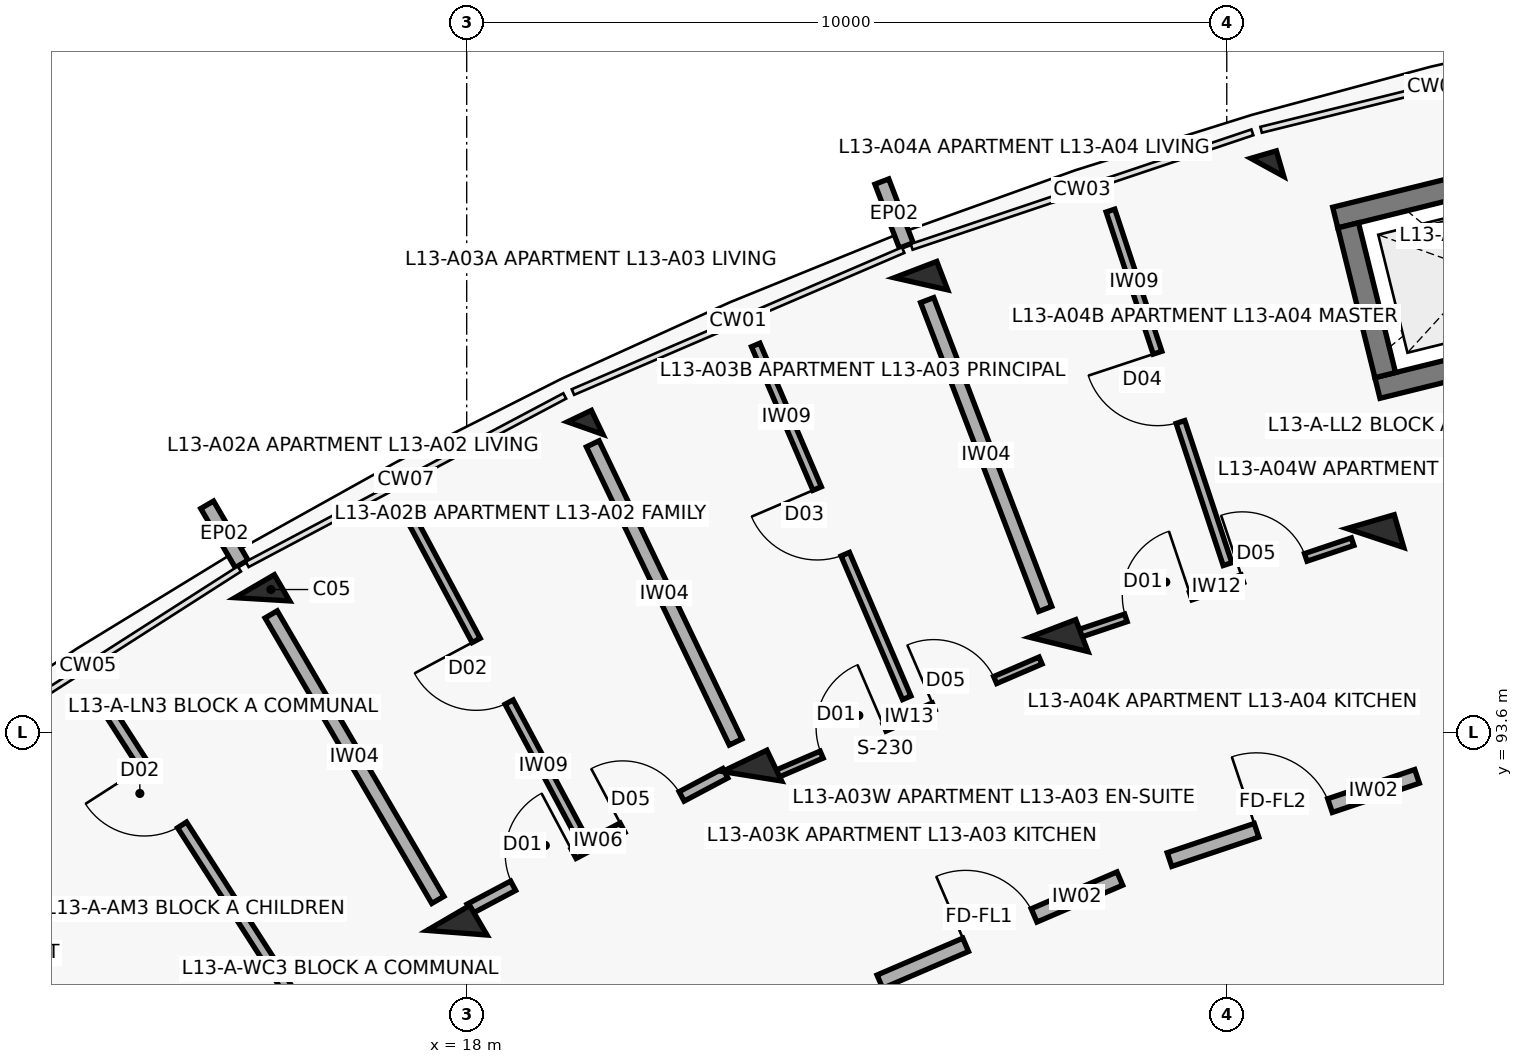
"""IFC4 building model, lengths in metres.
Left out: names, types, materials, properties, quantities, classifications, styles, units other than length and angle.
Written with IfcOpenShell. Run it as: python <this file> out.ifc"""

import sys

from ifc_helpers import new_model, si_unit, direction, frame, frame_2d, origin, origin_2d, place, context, subcontext, project, spatial, rectangle, extrude, element, fill, save


model = new_model("IFC4")
c1 = context("Model", 3, precision=1e-05, world=origin(), true_north=direction((0.0, 1.0)))
c2 = subcontext(c1, "Body", "Model", "MODEL_VIEW")
j1 = project(units=[si_unit("LENGTHUNIT", "METRE"), si_unit("PLANEANGLEUNIT", "RADIAN")], contexts=[c1])
p1 = place(None, origin())
s1 = spatial("IfcSite", under=j1, at=p1, CompositionType="ELEMENT")
p2 = place(p1, origin())
s2 = spatial("IfcBuilding", under=s1, at=p2, CompositionType="ELEMENT")
p3 = place(p2, frame((0.0, 0.0, 42.2)))
s3 = spatial("IfcBuildingStorey", under=s2, at=p3, CompositionType="ELEMENT", Elevation=42.2)
p4 = place(p3, frame((17.873, 90.96, 0.0), z_axis=(0.0, 0.0, 1.0), x_axis=(-0.504226211181, 0.863571611366, 0.0)))
e1 = element("IfcColumn", 1, at=p4, inside=s3, PredefinedType="COLUMN", context=c2, shape_type="SweptSolid", body=[
    extrude(rectangle(XDim=0.45, YDim=0.65, at=origin_2d()), origin(), (0.0, 0.0, 1.0), 3.1),
])
p5 = place(p3, frame((15.311, 95.347, 0.0), z_axis=(0.0, 0.0, 1.0), x_axis=(-0.504226211181, 0.863571611366, 0.0)))
e2 = element("IfcColumn", 2, at=p5, inside=s3, PredefinedType="COLUMN", context=c2, shape_type="SweptSolid", body=[
    extrude(rectangle(XDim=0.4, YDim=0.6, at=origin_2d()), origin(), (0.0, 0.0, 1.0), 3.1),
])
p6 = place(p3, frame((21.754, 93.019, 0.0), z_axis=(0.0, 0.0, 1.0), x_axis=(-0.432085748802, 0.901832526405, 0.0)))
e3 = element("IfcColumn", 3, at=p6, inside=s3, PredefinedType="COLUMN", context=c2, shape_type="SweptSolid", body=[
    extrude(rectangle(XDim=0.45, YDim=0.65, at=origin_2d()), origin(), (0.0, 0.0, 1.0), 3.1),
])
p7 = place(p3, frame((19.559, 97.6, 0.0), z_axis=(0.0, 0.0, 1.0), x_axis=(-0.432085748802, 0.901832526405, 0.0)))
e4 = element("IfcColumn", 4, at=p7, inside=s3, PredefinedType="COLUMN", context=c2, shape_type="SweptSolid", body=[
    extrude(rectangle(XDim=0.35, YDim=0.35, at=origin_2d()), origin(), (0.0, 0.0, 1.0), 3.1),
])
p8 = place(p3, frame((25.79, 94.753, 0.0), z_axis=(0.0, 0.0, 1.0), x_axis=(-0.357064076459, 0.934079892355, 0.0)))
e5 = element("IfcColumn", 5, at=p8, inside=s3, PredefinedType="COLUMN", context=c2, shape_type="SweptSolid", body=[
    extrude(rectangle(XDim=0.45, YDim=0.65, at=origin_2d()), origin(), (0.0, 0.0, 1.0), 3.1),
])
p9 = place(p3, frame((23.976, 99.499, 0.0), z_axis=(0.0, 0.0, 1.0), x_axis=(-0.357064076459, 0.934079892355, 0.0)))
e6 = element("IfcColumn", 6, at=p9, inside=s3, PredefinedType="COLUMN", context=c2, shape_type="SweptSolid", body=[
    extrude(rectangle(XDim=0.4, YDim=0.6, at=origin_2d()), origin(), (0.0, 0.0, 1.0), 3.1),
])
p10 = place(p3, frame((29.954, 96.153, 0.0), z_axis=(0.0, 0.0, 1.0), x_axis=(-0.27966144946, 0.96009867914, 0.0)))
e7 = element("IfcColumn", 7, at=p10, inside=s3, PredefinedType="COLUMN", context=c2, shape_type="SweptSolid", body=[
    extrude(rectangle(XDim=0.45, YDim=0.65, at=origin_2d()), origin(), (0.0, 0.0, 1.0), 3.1),
])
p11 = place(p3, frame((28.533, 101.031, 0.0), z_axis=(0.0, 0.0, 1.0), x_axis=(-0.27966144946, 0.96009867914, 0.0)))
e8 = element("IfcColumn", 8, at=p11, inside=s3, PredefinedType="COLUMN", context=c2, shape_type="SweptSolid", body=[
    extrude(rectangle(XDim=0.35, YDim=0.35, at=origin_2d()), origin(), (0.0, 0.0, 1.0), 3.1),
])
p12 = place(p3, frame((15.039, 95.813, 0.0), z_axis=(0.0, 0.0, 1.0), x_axis=(-0.504326383773, 0.863513114336, 0.0)))
e9 = element("IfcWall", 9, at=p12, inside=s3, PredefinedType="PARAPET", context=c2, shape_type="SweptSolid", body=[
    extrude(rectangle(XDim=0.9, YDim=0.195, at=frame_2d((0.45, 0.0))), origin(), (0.0, 0.0, 1.0), 2.25),
])
p13 = place(p3, frame((23.783, 100.003, 0.0), z_axis=(0.0, 0.0, 1.0), x_axis=(-0.356942580168, 0.934126326823, 0.0)))
e10 = element("IfcWall", 10, at=p13, inside=s3, PredefinedType="PARAPET", context=c2, shape_type="SweptSolid", body=[
    extrude(rectangle(XDim=0.9, YDim=0.195, at=frame_2d((0.45, 0.0))), origin(), (0.0, 0.0, 1.0), 2.25),
])
p14 = place(p3, frame((33.273, 98.942, 0.0), z_axis=(0.0, 0.0, 1.0), x_axis=(-0.970707542441, -0.240264160972, 0.0)))
e11 = element("IfcWall", 11, at=p14, inside=s3, PredefinedType="SHEAR", context=c2, shape_type="SweptSolid", body=[
    extrude(rectangle(XDim=3.39, YDim=0.28, at=frame_2d((1.695, 0.0))), origin(), (0.0, 0.0, 1.0), 3.55),
])
p15 = place(p14, frame((1.095, 0.0, 0.0)))
e12 = element("IfcOpeningElement", 12, at=p15, cuts=e11, PredefinedType="OPENING", context=c2, shape_type="SweptSolid", body=[
    extrude(rectangle(XDim=1.2, YDim=2.15, at=frame_2d((0.6, 1.075))), frame((0.0, 0.15, 0.0), z_axis=(0.0, -1.0, 0.0), x_axis=(1.0, 0.0, 0.0)), (0.0, 0.0, 1.0), 0.3),
])
p16 = place(p3, frame((32.718, 101.185, 0.0), z_axis=(0.0, 0.0, 1.0), x_axis=(-0.970711699588, -0.240247364777, 0.0)))
e13 = element("IfcWall", 13, at=p16, inside=s3, PredefinedType="SHEAR", context=c2, shape_type="SweptSolid", body=[
    extrude(rectangle(XDim=3.39, YDim=0.28, at=frame_2d((1.695, 0.0))), origin(), (0.0, 0.0, 1.0), 3.55),
])
p17 = place(p3, frame((30.085, 98.297, 0.0), z_axis=(0.0, 0.0, 1.0), x_axis=(-0.2402993748, 0.970698825832, 0.0)))
e14 = element("IfcWall", 14, at=p17, inside=s3, PredefinedType="SHEAR", context=c2, shape_type="SweptSolid", body=[
    extrude(rectangle(XDim=2.03, YDim=0.28, at=frame_2d((1.015, 0.0))), origin(), (0.0, 0.0, 1.0), 3.55),
])
p18 = place(p3, frame((17.524, 87.288, 0.0), z_axis=(0.0, 0.0, 1.0), x_axis=(-0.540338452216, 0.841447774408, 0.0)))
e15 = element("IfcWall", 15, at=p18, inside=s3, PredefinedType="PARTITIONING", context=c2, shape_type="SweptSolid", body=[
    extrude(rectangle(XDim=7.95, YDim=0.14, at=frame_2d((3.975, 0.0))), origin(), (0.0, 0.0, 1.0), 2.14),
])
p19 = place(p18, frame((6.05, 0.0, 0.0)))
e16 = element("IfcOpeningElement", 16, at=p19, cuts=e15, PredefinedType="OPENING", context=c2, shape_type="SweptSolid", body=[
    extrude(rectangle(XDim=0.92, YDim=2.1, at=frame_2d((0.46, 1.05))), frame((0.0, 0.08, 0.0), z_axis=(0.0, -1.0, 0.0), x_axis=(1.0, 0.0, 0.0)), (0.0, 0.0, 1.0), 0.16),
])
p20 = place(p3, frame((18.037, 91.273, 0.0), z_axis=(0.0, 0.0, 1.0), x_axis=(0.883441603894, 0.468541281543, 0.0)))
e17 = element("IfcWall", 17, at=p20, inside=s3, PredefinedType="PARTITIONING", context=c2, shape_type="SweptSolid", body=[
    extrude(rectangle(XDim=3.81, YDim=0.14, at=frame_2d((1.905, 0.0))), origin(), (0.0, 0.0, 1.0), 2.14),
])
p21 = place(p20, frame((0.65, 0.0, 0.0)))
e18 = element("IfcOpeningElement", 18, at=p21, cuts=e17, PredefinedType="OPENING", context=c2, shape_type="SweptSolid", body=[
    extrude(rectangle(XDim=0.9, YDim=2.1, at=frame_2d((0.45, 1.05))), frame((0.0, 0.08, 0.0), z_axis=(0.0, -1.0, 0.0), x_axis=(1.0, 0.0, 0.0)), (0.0, 0.0, 1.0), 0.16),
])
p22 = place(p20, frame((2.28, 0.0, 0.0)))
e19 = element("IfcOpeningElement", 19, at=p22, cuts=e17, PredefinedType="OPENING", context=c2, shape_type="SweptSolid", body=[
    extrude(rectangle(XDim=0.88, YDim=2.1, at=frame_2d((0.44, 1.05))), frame((0.0, 0.08, 0.0), z_axis=(0.0, -1.0, 0.0), x_axis=(1.0, 0.0, 0.0)), (0.0, 0.0, 1.0), 0.16),
])
p23 = place(p3, frame((19.46, 92.306, 0.0), z_axis=(0.0, 0.0, 1.0), x_axis=(-0.471228378949, 0.88201123285, 0.0)))
e20 = element("IfcWall", 20, at=p23, inside=s3, PredefinedType="PARTITIONING", context=c2, shape_type="SweptSolid", body=[
    extrude(rectangle(XDim=4.75, YDim=0.12, at=frame_2d((2.375, 0.0))), origin(), (0.0, 0.0, 1.0), 2.14),
])
p24 = place(p23, frame((1.915, 0.0, 0.0)))
e21 = element("IfcOpeningElement", 21, at=p24, cuts=e20, PredefinedType="OPENING", context=c2, shape_type="SweptSolid", body=[
    extrude(rectangle(XDim=0.92, YDim=2.1, at=frame_2d((0.46, 1.05))), frame((0.0, 0.07, 0.0), z_axis=(0.0, -1.0, 0.0), x_axis=(1.0, 0.0, 0.0)), (0.0, 0.0, 1.0), 0.14),
])
p25 = place(p3, frame((17.621, 91.392, 0.0), z_axis=(0.0, 0.0, 1.0), x_axis=(-0.504216452091, 0.863577309475, 0.0)))
e22 = element("IfcWall", 22, at=p25, inside=s3, PredefinedType="SOLIDWALL", context=c2, shape_type="SweptSolid", body=[
    extrude(rectangle(XDim=4.35, YDim=0.185, at=frame_2d((2.175, 0.0))), origin(), (0.0, 0.0, 1.0), 2.14),
])
p26 = place(p3, frame((23.437, 90.316, 0.0), z_axis=(0.0, 0.0, 1.0), x_axis=(0.918718172399, 0.394913813008, 0.0)))
e23 = element("IfcWall", 23, at=p26, inside=s3, PredefinedType="SOLIDWALL", context=c2, shape_type="SweptSolid", body=[
    extrude(rectangle(XDim=3.436, YDim=0.19, at=frame_2d((1.718, 0.0))), origin(), (0.0, 0.0, 1.0), 2.14),
])
p27 = place(p26, frame((1.228, 0.0, 0.0)))
e24 = element("IfcOpeningElement", 24, at=p27, cuts=e23, PredefinedType="OPENING", context=c2, shape_type="SweptSolid", body=[
    extrude(rectangle(XDim=0.98, YDim=2.15, at=frame_2d((0.49, 1.075))), frame((0.0, 0.105, 0.0), z_axis=(0.0, -1.0, 0.0), x_axis=(1.0, 0.0, 0.0)), (0.0, 0.0, 1.0), 0.21),
])
p28 = place(p3, frame((22.073, 93.047, 0.0), z_axis=(0.0, 0.0, 1.0), x_axis=(0.918737522346, 0.394868794707, 0.0)))
e25 = element("IfcWall", 25, at=p28, inside=s3, PredefinedType="PARTITIONING", context=c2, shape_type="SweptSolid", body=[
    extrude(rectangle(XDim=3.785, YDim=0.1, at=frame_2d((1.893, 0.0))), origin(), (0.0, 0.0, 1.0), 2.14),
])
p29 = place(p28, frame((0.65, 0.0, 0.0)))
e26 = element("IfcOpeningElement", 26, at=p29, cuts=e25, PredefinedType="OPENING", context=c2, shape_type="SweptSolid", body=[
    extrude(rectangle(XDim=0.9, YDim=2.1, at=frame_2d((0.45, 1.05))), frame((0.0, 0.06, 0.0), z_axis=(0.0, -1.0, 0.0), x_axis=(1.0, 0.0, 0.0)), (0.0, 0.0, 1.0), 0.12),
])
p30 = place(p28, frame((2.255, 0.0, 0.0)))
e27 = element("IfcOpeningElement", 27, at=p30, cuts=e25, PredefinedType="OPENING", context=c2, shape_type="SweptSolid", body=[
    extrude(rectangle(XDim=0.88, YDim=2.1, at=frame_2d((0.44, 1.05))), frame((0.0, 0.06, 0.0), z_axis=(0.0, -1.0, 0.0), x_axis=(1.0, 0.0, 0.0)), (0.0, 0.0, 1.0), 0.12),
])
p31 = place(p3, frame((23.789, 94.051, 0.0), z_axis=(0.0, 0.0, 1.0), x_axis=(-0.393539995583, 0.919307495823, 0.0)))
e28 = element("IfcWall", 28, at=p31, inside=s3, PredefinedType="PARTITIONING", context=c2, shape_type="SweptSolid", body=[
    extrude(rectangle(XDim=5.05, YDim=0.12, at=frame_2d((2.525, 0.0))), origin(), (0.0, 0.0, 1.0), 2.14),
])
p32 = place(p31, frame((2.055, 0.0, 0.0)))
e29 = element("IfcOpeningElement", 29, at=p32, cuts=e28, PredefinedType="OPENING", context=c2, shape_type="SweptSolid", body=[
    extrude(rectangle(XDim=0.94, YDim=2.1, at=frame_2d((0.47, 1.05))), frame((0.0, 0.07, 0.0), z_axis=(0.0, -1.0, 0.0), x_axis=(1.0, 0.0, 0.0)), (0.0, 0.0, 1.0), 0.14),
])
p33 = place(p3, frame((21.538, 93.469, 0.0), z_axis=(0.0, 0.0, 1.0), x_axis=(-0.432086898897, 0.901831975371, 0.0)))
e30 = element("IfcWall", 30, at=p33, inside=s3, PredefinedType="SOLIDWALL", context=c2, shape_type="SweptSolid", body=[
    extrude(rectangle(XDim=4.35, YDim=0.185, at=frame_2d((2.175, 0.0))), origin(), (0.0, 0.0, 1.0), 2.14),
])
p34 = place(p3, frame((27.247, 91.923, 0.0), z_axis=(0.0, 0.0, 1.0), x_axis=(0.947863007629, 0.318678080151, 0.0)))
e31 = element("IfcWall", 31, at=p34, inside=s3, PredefinedType="SOLIDWALL", context=c2, shape_type="SweptSolid", body=[
    extrude(rectangle(XDim=3.436, YDim=0.19, at=frame_2d((1.718, 0.0))), origin(), (0.0, 0.0, 1.0), 2.14),
])
p35 = place(p34, frame((1.208, 0.0, 0.0)))
e32 = element("IfcOpeningElement", 32, at=p35, cuts=e31, PredefinedType="OPENING", context=c2, shape_type="SweptSolid", body=[
    extrude(rectangle(XDim=1.02, YDim=2.15, at=frame_2d((0.51, 1.075))), frame((0.0, 0.105, 0.0), z_axis=(0.0, -1.0, 0.0), x_axis=(1.0, 0.0, 0.0)), (0.0, 0.0, 1.0), 0.21),
])
p36 = place(p3, frame((26.056, 94.896, 0.0), z_axis=(0.0, 0.0, 1.0), x_axis=(0.947876567739, 0.318637744673, 0.0)))
e33 = element("IfcWall", 33, at=p36, inside=s3, PredefinedType="PARTITIONING", context=c2, shape_type="SweptSolid", body=[
    extrude(rectangle(XDim=3.797, YDim=0.105, at=frame_2d((1.899, 0.0))), origin(), (0.0, 0.0, 1.0), 2.14),
])
p37 = place(p36, frame((0.65, 0.0, 0.0)))
e34 = element("IfcOpeningElement", 34, at=p37, cuts=e33, PredefinedType="OPENING", context=c2, shape_type="SweptSolid", body=[
    extrude(rectangle(XDim=0.9, YDim=2.1, at=frame_2d((0.45, 1.05))), frame((0.0, 0.062, 0.0), z_axis=(0.0, -1.0, 0.0), x_axis=(1.0, 0.0, 0.0)), (0.0, 0.0, 1.0), 0.125),
])
p38 = place(p36, frame((2.267, 0.0, 0.0)))
e35 = element("IfcOpeningElement", 35, at=p38, cuts=e33, PredefinedType="OPENING", context=c2, shape_type="SweptSolid", body=[
    extrude(rectangle(XDim=0.88, YDim=2.1, at=frame_2d((0.44, 1.05))), frame((0.0, 0.062, 0.0), z_axis=(0.0, -1.0, 0.0), x_axis=(1.0, 0.0, 0.0)), (0.0, 0.0, 1.0), 0.125),
])
p39 = place(p3, frame((28.01, 95.81, 0.0), z_axis=(0.0, 0.0, 1.0), x_axis=(-0.314343770763, 0.949309219266, 0.0)))
e36 = element("IfcWall", 36, at=p39, inside=s3, PredefinedType="PARTITIONING", context=c2, shape_type="SweptSolid", body=[
    extrude(rectangle(XDim=4.9, YDim=0.12, at=frame_2d((2.45, 0.0))), origin(), (0.0, 0.0, 1.0), 2.14),
])
p40 = place(p39, frame((1.97, 0.0, 0.0)))
e37 = element("IfcOpeningElement", 37, at=p40, cuts=e36, PredefinedType="OPENING", context=c2, shape_type="SweptSolid", body=[
    extrude(rectangle(XDim=0.96, YDim=2.1, at=frame_2d((0.48, 1.05))), frame((0.0, 0.07, 0.0), z_axis=(0.0, -1.0, 0.0), x_axis=(1.0, 0.0, 0.0)), (0.0, 0.0, 1.0), 0.14),
])
p41 = place(p3, frame((25.611, 95.22, 0.0), z_axis=(0.0, 0.0, 1.0), x_axis=(-0.357064016205, 0.934079915388, 0.0)))
e38 = element("IfcWall", 38, at=p41, inside=s3, PredefinedType="SOLIDWALL", context=c2, shape_type="SweptSolid", body=[
    extrude(rectangle(XDim=4.35, YDim=0.185, at=frame_2d((2.175, 0.0))), origin(), (0.0, 0.0, 1.0), 2.14),
])
p42 = place(p19, origin())
e39 = element("IfcDoor", 39, at=p42, inside=s3, OperationType="SINGLE_SWING_RIGHT", PredefinedType="DOOR", context=c2, shape_type="SweptSolid", body=[
    extrude(rectangle(XDim=0.92, YDim=2.1, at=frame_2d((0.46, 1.05))), frame((0.0, 0.025, 0.0), z_axis=(0.0, -1.0, 0.0), x_axis=(1.0, 0.0, 0.0)), (0.0, 0.0, 1.0), 0.05),
])
fill(e16, e39)
p43 = place(p21, origin())
e40 = element("IfcDoor", 40, at=p43, inside=s3, OperationType="SINGLE_SWING_RIGHT", PredefinedType="DOOR", context=c2, shape_type="SweptSolid", body=[
    extrude(rectangle(XDim=0.9, YDim=2.1, at=frame_2d((0.45, 1.05))), frame((0.0, 0.025, 0.0), z_axis=(0.0, -1.0, 0.0), x_axis=(1.0, 0.0, 0.0)), (0.0, 0.0, 1.0), 0.05),
])
fill(e18, e40)
p44 = place(p22, origin())
e41 = element("IfcDoor", 41, at=p44, inside=s3, OperationType="SINGLE_SWING_LEFT", PredefinedType="DOOR", context=c2, shape_type="SweptSolid", body=[
    extrude(rectangle(XDim=0.88, YDim=2.1, at=frame_2d((0.44, 1.05))), frame((0.0, 0.025, 0.0), z_axis=(0.0, -1.0, 0.0), x_axis=(1.0, 0.0, 0.0)), (0.0, 0.0, 1.0), 0.05),
])
fill(e19, e41)
p45 = place(p24, origin())
e42 = element("IfcDoor", 42, at=p45, inside=s3, OperationType="SINGLE_SWING_RIGHT", PredefinedType="DOOR", context=c2, shape_type="SweptSolid", body=[
    extrude(rectangle(XDim=0.92, YDim=2.1, at=frame_2d((0.46, 1.05))), frame((0.0, 0.025, 0.0), z_axis=(0.0, -1.0, 0.0), x_axis=(1.0, 0.0, 0.0)), (0.0, 0.0, 1.0), 0.05),
])
fill(e21, e42)
p46 = place(p27, origin())
e43 = element("IfcDoor", 43, at=p46, inside=s3, OperationType="SINGLE_SWING_LEFT", PredefinedType="DOOR", context=c2, shape_type="SweptSolid", body=[
    extrude(rectangle(XDim=0.98, YDim=2.15, at=frame_2d((0.49, 1.075))), frame((0.0, 0.025, 0.0), z_axis=(0.0, -1.0, 0.0), x_axis=(1.0, 0.0, 0.0)), (0.0, 0.0, 1.0), 0.05),
])
fill(e24, e43)
p47 = place(p29, origin())
e44 = element("IfcDoor", 44, at=p47, inside=s3, OperationType="SINGLE_SWING_RIGHT", PredefinedType="DOOR", context=c2, shape_type="SweptSolid", body=[
    extrude(rectangle(XDim=0.9, YDim=2.1, at=frame_2d((0.45, 1.05))), frame((0.0, 0.025, 0.0), z_axis=(0.0, -1.0, 0.0), x_axis=(1.0, 0.0, 0.0)), (0.0, 0.0, 1.0), 0.05),
])
fill(e26, e44)
p48 = place(p30, origin())
e45 = element("IfcDoor", 45, at=p48, inside=s3, OperationType="SINGLE_SWING_LEFT", PredefinedType="DOOR", context=c2, shape_type="SweptSolid", body=[
    extrude(rectangle(XDim=0.88, YDim=2.1, at=frame_2d((0.44, 1.05))), frame((0.0, 0.025, 0.0), z_axis=(0.0, -1.0, 0.0), x_axis=(1.0, 0.0, 0.0)), (0.0, 0.0, 1.0), 0.05),
])
fill(e27, e45)
p49 = place(p32, origin())
e46 = element("IfcDoor", 46, at=p49, inside=s3, OperationType="SINGLE_SWING_RIGHT", PredefinedType="DOOR", context=c2, shape_type="SweptSolid", body=[
    extrude(rectangle(XDim=0.94, YDim=2.1, at=frame_2d((0.47, 1.05))), frame((0.0, 0.025, 0.0), z_axis=(0.0, -1.0, 0.0), x_axis=(1.0, 0.0, 0.0)), (0.0, 0.0, 1.0), 0.05),
])
fill(e29, e46)
p50 = place(p35, origin())
e47 = element("IfcDoor", 47, at=p50, inside=s3, OperationType="SINGLE_SWING_LEFT", PredefinedType="DOOR", context=c2, shape_type="SweptSolid", body=[
    extrude(rectangle(XDim=1.02, YDim=2.15, at=frame_2d((0.51, 1.075))), frame((0.0, 0.025, 0.0), z_axis=(0.0, -1.0, 0.0), x_axis=(1.0, 0.0, 0.0)), (0.0, 0.0, 1.0), 0.05),
])
fill(e32, e47)
p51 = place(p37, origin())
e48 = element("IfcDoor", 48, at=p51, inside=s3, OperationType="SINGLE_SWING_RIGHT", PredefinedType="DOOR", context=c2, shape_type="SweptSolid", body=[
    extrude(rectangle(XDim=0.9, YDim=2.1, at=frame_2d((0.45, 1.05))), frame((0.0, 0.025, 0.0), z_axis=(0.0, -1.0, 0.0), x_axis=(1.0, 0.0, 0.0)), (0.0, 0.0, 1.0), 0.05),
])
fill(e34, e48)
p52 = place(p38, origin())
e49 = element("IfcDoor", 49, at=p52, inside=s3, OperationType="SINGLE_SWING_LEFT", PredefinedType="DOOR", context=c2, shape_type="SweptSolid", body=[
    extrude(rectangle(XDim=0.88, YDim=2.1, at=frame_2d((0.44, 1.05))), frame((0.0, 0.025, 0.0), z_axis=(0.0, -1.0, 0.0), x_axis=(1.0, 0.0, 0.0)), (0.0, 0.0, 1.0), 0.05),
])
fill(e35, e49)
p53 = place(p40, origin())
e50 = element("IfcDoor", 50, at=p53, inside=s3, OperationType="SINGLE_SWING_RIGHT", PredefinedType="DOOR", context=c2, shape_type="SweptSolid", body=[
    extrude(rectangle(XDim=0.96, YDim=2.1, at=frame_2d((0.48, 1.05))), frame((0.0, 0.025, 0.0), z_axis=(0.0, -1.0, 0.0), x_axis=(1.0, 0.0, 0.0)), (0.0, 0.0, 1.0), 0.05),
])
fill(e37, e50)
save(model, sys.argv[1])
